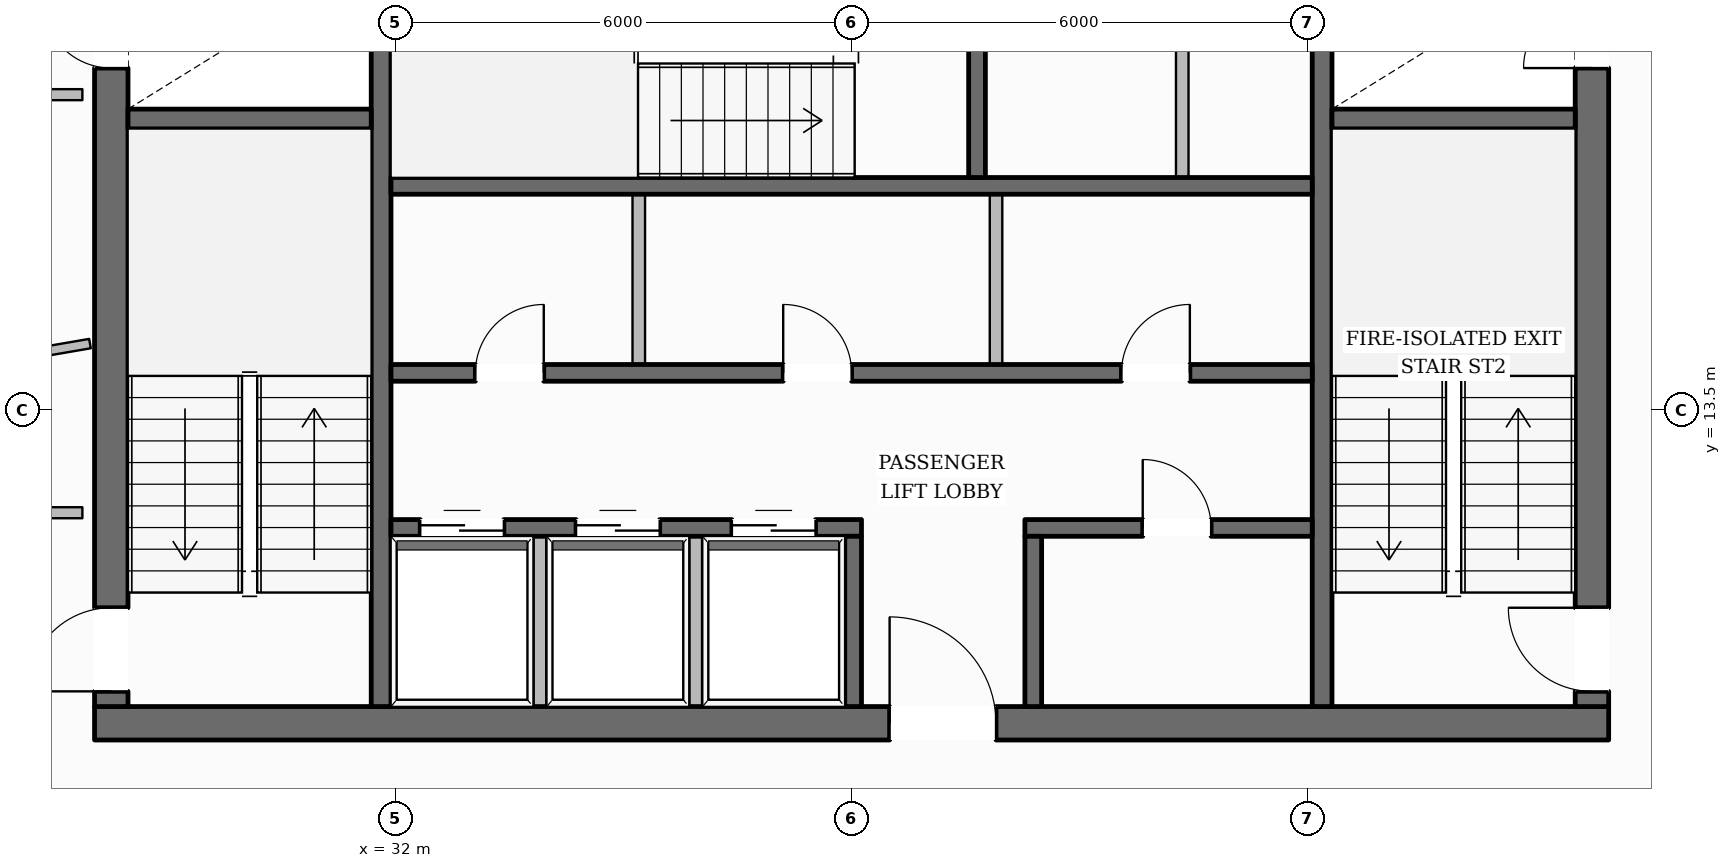
"""IFC4 building model, lengths in metres.
Left out: names, types, materials, properties, quantities, classifications, styles, units other than length and angle.
Written with IfcOpenShell. Run it as: python <this file> out.ifc"""

import sys

from ifc_helpers import new_model, si_unit, direction, frame, frame_2d, origin, place, context, subcontext, project, spatial, rectangle, extrude, element, fill, save


model = new_model("IFC4")
c1 = context("Model", 3, precision=1e-05, world=origin(), true_north=direction((0.0, 1.0)))
c2 = subcontext(c1, "Body", "Model", "MODEL_VIEW")
j1 = project(units=[si_unit("LENGTHUNIT", "METRE"), si_unit("PLANEANGLEUNIT", "RADIAN")], contexts=[c1])
p1 = place(None, origin())
s1 = spatial("IfcSite", under=j1, at=p1, CompositionType="ELEMENT")
p2 = place(p1, origin())
s2 = spatial("IfcBuilding", under=s1, at=p2, CompositionType="ELEMENT")
p3 = place(p2, frame((0.0, 0.0, 184.25)))
s3 = spatial("IfcBuildingStorey", under=s2, at=p3, CompositionType="ELEMENT", Elevation=184.25)
p4 = place(p3, frame((28.04, 9.38, 0.0), z_axis=(0.0, 0.0, 1.0), x_axis=(1.0, 0.0, 0.0)))
e1 = element("IfcWall", 1, at=p4, inside=s3, PredefinedType="SOLIDWALL", context=c2, shape_type="SweptSolid", body=[
    extrude(rectangle(XDim=19.92, YDim=0.44, at=frame_2d((9.96, 0.0))), origin(), (0.0, 0.0, 1.0), 3.6),
])
p5 = place(p4, frame((10.46, 0.0, 0.0)))
e2 = element("IfcOpeningElement", 2, at=p5, cuts=e1, PredefinedType="OPENING", context=c2, shape_type="SweptSolid", body=[
    extrude(rectangle(XDim=1.4, YDim=2.2, at=frame_2d((0.7, 1.1))), frame((0.0, 0.23, 0.0), z_axis=(0.0, -1.0, 0.0), x_axis=(1.0, 0.0, 0.0)), (0.0, 0.0, 1.0), 0.46),
])
p6 = place(p3, frame((28.26, 9.6, 0.0), z_axis=(0.0, 0.0, 1.0), x_axis=(0.0, 1.0, 0.0)))
e3 = element("IfcWall", 3, at=p6, inside=s3, PredefinedType="SOLIDWALL", context=c2, shape_type="SweptSolid", body=[
    extrude(rectangle(XDim=13.0, YDim=0.44, at=frame_2d((6.5, 0.0))), origin(), (0.0, 0.0, 1.0), 3.6),
])
p7 = place(p6, frame((0.2, 0.0, 0.0)))
e4 = element("IfcOpeningElement", 4, at=p7, cuts=e3, PredefinedType="OPENING", context=c2, shape_type="SweptSolid", body=[
    extrude(rectangle(XDim=1.1, YDim=2.15, at=frame_2d((0.55, 1.075))), frame((0.0, 0.23, 0.0), z_axis=(0.0, -1.0, 0.0), x_axis=(1.0, 0.0, 0.0)), (0.0, 0.0, 1.0), 0.46),
])
p8 = place(p6, frame((8.4, 0.0, 0.0)))
e5 = element("IfcOpeningElement", 5, at=p8, cuts=e3, PredefinedType="OPENING", context=c2, shape_type="SweptSolid", body=[
    extrude(rectangle(XDim=0.9, YDim=2.1, at=frame_2d((0.45, 1.05))), frame((0.0, 0.23, 0.0), z_axis=(0.0, -1.0, 0.0), x_axis=(1.0, 0.0, 0.0)), (0.0, 0.0, 1.0), 0.46),
])
p9 = place(p3, frame((47.74, 9.6, 0.0), z_axis=(0.0, 0.0, 1.0), x_axis=(0.0, 1.0, 0.0)))
e6 = element("IfcWall", 6, at=p9, inside=s3, PredefinedType="SOLIDWALL", context=c2, shape_type="SweptSolid", body=[
    extrude(rectangle(XDim=13.0, YDim=0.44, at=frame_2d((6.5, 0.0))), origin(), (0.0, 0.0, 1.0), 3.6),
])
p10 = place(p9, frame((0.2, 0.0, 0.0)))
e7 = element("IfcOpeningElement", 7, at=p10, cuts=e6, PredefinedType="OPENING", context=c2, shape_type="SweptSolid", body=[
    extrude(rectangle(XDim=1.1, YDim=2.15, at=frame_2d((0.55, 1.075))), frame((0.0, 0.23, 0.0), z_axis=(0.0, -1.0, 0.0), x_axis=(1.0, 0.0, 0.0)), (0.0, 0.0, 1.0), 0.46),
])
p11 = place(p9, frame((8.4, 0.0, 0.0)))
e8 = element("IfcOpeningElement", 8, at=p11, cuts=e6, PredefinedType="OPENING", context=c2, shape_type="SweptSolid", body=[
    extrude(rectangle(XDim=0.9, YDim=2.1, at=frame_2d((0.45, 1.05))), frame((0.0, 0.23, 0.0), z_axis=(0.0, -1.0, 0.0), x_axis=(1.0, 0.0, 0.0)), (0.0, 0.0, 1.0), 0.46),
])
p12 = place(p3, frame((31.81, 9.6, 0.0), z_axis=(0.0, 0.0, 1.0), x_axis=(0.0, 1.0, 0.0)))
e9 = element("IfcWall", 9, at=p12, inside=s3, PredefinedType="SHEAR", context=c2, shape_type="SweptSolid", body=[
    extrude(rectangle(XDim=13.0, YDim=0.26, at=frame_2d((6.5, 0.0))), origin(), (0.0, 0.0, 1.0), 3.6),
])
p13 = place(p12, frame((10.925, 0.0, 0.0)))
e10 = element("IfcOpeningElement", 10, at=p13, cuts=e9, PredefinedType="OPENING", context=c2, shape_type="SweptSolid", body=[
    extrude(rectangle(XDim=1.25, YDim=2.25, at=frame_2d((0.625, 1.125))), frame((0.0, 0.14, 0.0), z_axis=(0.0, -1.0, 0.0), x_axis=(1.0, 0.0, 0.0)), (0.0, 0.0, 1.0), 0.28),
])
p14 = place(p3, frame((44.19, 9.6, 0.0), z_axis=(0.0, 0.0, 1.0), x_axis=(0.0, 1.0, 0.0)))
e11 = element("IfcWall", 11, at=p14, inside=s3, PredefinedType="SHEAR", context=c2, shape_type="SweptSolid", body=[
    extrude(rectangle(XDim=13.0, YDim=0.26, at=frame_2d((6.5, 0.0))), origin(), (0.0, 0.0, 1.0), 3.6),
])
p15 = place(p14, frame((10.925, 0.0, 0.0)))
e12 = element("IfcOpeningElement", 12, at=p15, cuts=e11, PredefinedType="OPENING", context=c2, shape_type="SweptSolid", body=[
    extrude(rectangle(XDim=1.25, YDim=2.25, at=frame_2d((0.625, 1.125))), frame((0.0, 0.14, 0.0), z_axis=(0.0, -1.0, 0.0), x_axis=(1.0, 0.0, 0.0)), (0.0, 0.0, 1.0), 0.28),
])
for number, where, z_axis, x_axis in (
    (13, (28.48, 17.33, 0.0), (0.0, 0.0, 1.0), (1.0, 0.0, 0.0)),
    (14, (44.32, 17.33, 0.0), (0.0, 0.0, 1.0), (1.0, 0.0, 0.0)),
):
    element("IfcWall", number, at=place(p3, frame(where, z_axis=z_axis, x_axis=x_axis)), inside=s3, PredefinedType="SHEAR", context=c2, shape_type="SweptSolid", body=[
        extrude(rectangle(XDim=3.2, YDim=0.26, at=frame_2d((1.6, 0.0))), origin(), (0.0, 0.0, 1.0), 3.6),
    ])
p16 = place(p3, frame((31.94, 16.45, 0.0), z_axis=(0.0, 0.0, 1.0), x_axis=(1.0, 0.0, 0.0)))
e15 = element("IfcWall", 15, at=p16, inside=s3, PredefinedType="SOLIDWALL", context=c2, shape_type="SweptSolid", body=[
    extrude(rectangle(XDim=12.12, YDim=0.22, at=frame_2d((6.06, 0.0))), origin(), (0.0, 0.0, 1.0), 3.6),
])
p17 = place(p3, frame((39.65, 16.56, 0.0), z_axis=(0.0, 0.0, 1.0), x_axis=(0.0, 1.0, 0.0)))
e16 = element("IfcWall", 16, at=p17, inside=s3, PredefinedType="SOLIDWALL", context=c2, shape_type="SweptSolid", body=[
    extrude(rectangle(XDim=3.2, YDim=0.22, at=frame_2d((1.6, 0.0))), origin(), (0.0, 0.0, 1.0), 3.6),
])
p18 = place(p3, frame((31.94, 13.99, 0.0), z_axis=(0.0, 0.0, 1.0), x_axis=(1.0, 0.0, 0.0)))
e17 = element("IfcWall", 17, at=p18, inside=s3, PredefinedType="SOLIDWALL", context=c2, shape_type="SweptSolid", body=[
    extrude(rectangle(XDim=12.12, YDim=0.22, at=frame_2d((6.06, 0.0))), origin(), (0.0, 0.0, 1.0), 3.6),
])
p19 = place(p18, frame((1.11, 0.0, 0.0)))
e18 = element("IfcOpeningElement", 18, at=p19, cuts=e17, PredefinedType="OPENING", context=c2, shape_type="SweptSolid", body=[
    extrude(rectangle(XDim=0.9, YDim=2.1, at=frame_2d((0.45, 1.05))), frame((0.0, 0.12, 0.0), z_axis=(0.0, -1.0, 0.0), x_axis=(1.0, 0.0, 0.0)), (0.0, 0.0, 1.0), 0.24),
])
p20 = place(p18, frame((5.16, 0.0, 0.0)))
e19 = element("IfcOpeningElement", 19, at=p20, cuts=e17, PredefinedType="OPENING", context=c2, shape_type="SweptSolid", body=[
    extrude(rectangle(XDim=0.9, YDim=2.1, at=frame_2d((0.45, 1.05))), frame((0.0, 0.12, 0.0), z_axis=(0.0, -1.0, 0.0), x_axis=(1.0, 0.0, 0.0)), (0.0, 0.0, 1.0), 0.24),
])
p21 = place(p18, frame((9.61, 0.0, 0.0)))
e20 = element("IfcOpeningElement", 20, at=p21, cuts=e17, PredefinedType="OPENING", context=c2, shape_type="SweptSolid", body=[
    extrude(rectangle(XDim=0.9, YDim=2.1, at=frame_2d((0.45, 1.05))), frame((0.0, 0.12, 0.0), z_axis=(0.0, -1.0, 0.0), x_axis=(1.0, 0.0, 0.0)), (0.0, 0.0, 1.0), 0.24),
])
p22 = place(p3, frame((31.94, 11.95, 0.0), z_axis=(0.0, 0.0, 1.0), x_axis=(1.0, 0.0, 0.0)))
e21 = element("IfcWall", 21, at=p22, inside=s3, PredefinedType="SOLIDWALL", context=c2, shape_type="SweptSolid", body=[
    extrude(rectangle(XDim=6.19, YDim=0.22, at=frame_2d((3.095, 0.0))), origin(), (0.0, 0.0, 1.0), 3.6),
])
p23 = place(p22, frame((0.385, 0.0, 0.0)))
e22 = element("IfcOpeningElement", 22, at=p23, cuts=e21, PredefinedType="OPENING", context=c2, shape_type="SweptSolid", body=[
    extrude(rectangle(XDim=1.1, YDim=2.2, at=frame_2d((0.55, 1.1))), frame((0.0, 0.12, 0.0), z_axis=(0.0, -1.0, 0.0), x_axis=(1.0, 0.0, 0.0)), (0.0, 0.0, 1.0), 0.24),
])
p24 = place(p22, frame((2.435, 0.0, 0.0)))
e23 = element("IfcOpeningElement", 23, at=p24, cuts=e21, PredefinedType="OPENING", context=c2, shape_type="SweptSolid", body=[
    extrude(rectangle(XDim=1.1, YDim=2.2, at=frame_2d((0.55, 1.1))), frame((0.0, 0.12, 0.0), z_axis=(0.0, -1.0, 0.0), x_axis=(1.0, 0.0, 0.0)), (0.0, 0.0, 1.0), 0.24),
])
p25 = place(p22, frame((4.485, 0.0, 0.0)))
e24 = element("IfcOpeningElement", 24, at=p25, cuts=e21, PredefinedType="OPENING", context=c2, shape_type="SweptSolid", body=[
    extrude(rectangle(XDim=1.1, YDim=2.2, at=frame_2d((0.55, 1.1))), frame((0.0, 0.12, 0.0), z_axis=(0.0, -1.0, 0.0), x_axis=(1.0, 0.0, 0.0)), (0.0, 0.0, 1.0), 0.24),
])
p26 = place(p3, frame((40.28, 11.95, 0.0), z_axis=(0.0, 0.0, 1.0), x_axis=(1.0, 0.0, 0.0)))
e25 = element("IfcWall", 25, at=p26, inside=s3, PredefinedType="SOLIDWALL", context=c2, shape_type="SweptSolid", body=[
    extrude(rectangle(XDim=3.78, YDim=0.22, at=frame_2d((1.89, 0.0))), origin(), (0.0, 0.0, 1.0), 3.6),
])
p27 = place(p26, frame((1.55, 0.0, 0.0)))
e26 = element("IfcOpeningElement", 26, at=p27, cuts=e25, PredefinedType="OPENING", context=c2, shape_type="SweptSolid", body=[
    extrude(rectangle(XDim=0.9, YDim=2.1, at=frame_2d((0.45, 1.05))), frame((0.0, 0.12, 0.0), z_axis=(0.0, -1.0, 0.0), x_axis=(1.0, 0.0, 0.0)), (0.0, 0.0, 1.0), 0.24),
])
for number, where, z_axis, x_axis in (
    (27, (38.02, 9.6, 0.0), (0.0, 0.0, 1.0), (0.0, 1.0, 0.0)),
    (28, (40.39, 9.6, 0.0), (0.0, 0.0, 1.0), (0.0, 1.0, 0.0)),
):
    element("IfcWall", number, at=place(p3, frame(where, z_axis=z_axis, x_axis=x_axis)), inside=s3, PredefinedType="SOLIDWALL", context=c2, shape_type="SweptSolid", body=[
        extrude(rectangle(XDim=2.24, YDim=0.22, at=frame_2d((1.12, 0.0))), origin(), (0.0, 0.0, 1.0), 3.6),
    ])
p28 = place(p3, frame((15.064, 11.953, 0.0), z_axis=(0.0, 0.0, 1.0), x_axis=(0.495993114815, 0.86832645362, 0.0)))
e29 = element("IfcWall", 29, at=p28, inside=s3, PredefinedType="STANDARD", context=c2, shape_type="SweptSolid", body=[
    extrude(rectangle(XDim=37.324, YDim=0.35, at=frame_2d((18.662, 0.0))), origin(), (0.0, 0.0, 1.0), 3.132),
])
p29 = place(p28, frame((33.087, 0.0, 0.65)))
e30 = element("IfcOpeningElement", 30, at=p29, cuts=e29, PredefinedType="OPENING", context=c2, shape_type="SweptSolid", body=[
    extrude(rectangle(XDim=1.45, YDim=1.75, at=frame_2d((0.725, 0.875))), frame((0.0, 0.185, 0.0), z_axis=(0.0, -1.0, 0.0), x_axis=(1.0, 0.0, 0.0)), (0.0, 0.0, 1.0), 0.37),
])
p30 = place(p28, frame((27.026, 0.0, 0.65)))
e31 = element("IfcOpeningElement", 31, at=p30, cuts=e29, PredefinedType="OPENING", context=c2, shape_type="SweptSolid", body=[
    extrude(rectangle(XDim=1.45, YDim=1.75, at=frame_2d((0.725, 0.875))), frame((0.0, 0.185, 0.0), z_axis=(0.0, -1.0, 0.0), x_axis=(1.0, 0.0, 0.0)), (0.0, 0.0, 1.0), 0.37),
])
p31 = place(p28, frame((14.904, 0.0, 0.65)))
e32 = element("IfcOpeningElement", 32, at=p31, cuts=e29, PredefinedType="OPENING", context=c2, shape_type="SweptSolid", body=[
    extrude(rectangle(XDim=1.45, YDim=1.75, at=frame_2d((0.725, 0.875))), frame((0.0, 0.185, 0.0), z_axis=(0.0, -1.0, 0.0), x_axis=(1.0, 0.0, 0.0)), (0.0, 0.0, 1.0), 0.37),
])
p32 = place(p28, frame((8.844, 0.0, 0.65)))
e33 = element("IfcOpeningElement", 33, at=p32, cuts=e29, PredefinedType="OPENING", context=c2, shape_type="SweptSolid", body=[
    extrude(rectangle(XDim=1.45, YDim=1.75, at=frame_2d((0.725, 0.875))), frame((0.0, 0.185, 0.0), z_axis=(0.0, -1.0, 0.0), x_axis=(1.0, 0.0, 0.0)), (0.0, 0.0, 1.0), 0.37),
])
p33 = place(p28, frame((2.782, 0.0, 0.65)))
e34 = element("IfcOpeningElement", 34, at=p33, cuts=e29, PredefinedType="OPENING", context=c2, shape_type="SweptSolid", body=[
    extrude(rectangle(XDim=1.45, YDim=1.75, at=frame_2d((0.725, 0.875))), frame((0.0, 0.185, 0.0), z_axis=(0.0, -1.0, 0.0), x_axis=(1.0, 0.0, 0.0)), (0.0, 0.0, 1.0), 0.37),
])
p34 = place(p3, frame((42.575, 44.272, 0.0), z_axis=(0.0, 0.0, 1.0), x_axis=(0.503934681705, -0.863741764982, 0.0)))
e35 = element("IfcWall", 35, at=p34, inside=s3, PredefinedType="STANDARD", context=c2, shape_type="SweptSolid", body=[
    extrude(rectangle(XDim=37.915, YDim=0.35, at=frame_2d((18.958, 0.0))), origin(), (0.0, 0.0, 1.0), 3.132),
])
p35 = place(p34, frame((33.633, 0.0, 0.65)))
e36 = element("IfcOpeningElement", 36, at=p35, cuts=e35, PredefinedType="OPENING", context=c2, shape_type="SweptSolid", body=[
    extrude(rectangle(XDim=1.45, YDim=1.75, at=frame_2d((0.725, 0.875))), frame((0.0, 0.185, 0.0), z_axis=(0.0, -1.0, 0.0), x_axis=(1.0, 0.0, 0.0)), (0.0, 0.0, 1.0), 0.37),
])
p36 = place(p34, frame((27.472, 0.0, 0.65)))
e37 = element("IfcOpeningElement", 37, at=p36, cuts=e35, PredefinedType="OPENING", context=c2, shape_type="SweptSolid", body=[
    extrude(rectangle(XDim=1.45, YDim=1.75, at=frame_2d((0.725, 0.875))), frame((0.0, 0.185, 0.0), z_axis=(0.0, -1.0, 0.0), x_axis=(1.0, 0.0, 0.0)), (0.0, 0.0, 1.0), 0.37),
])
p37 = place(p34, frame((15.15, 0.0, 0.65)))
e38 = element("IfcOpeningElement", 38, at=p37, cuts=e35, PredefinedType="OPENING", context=c2, shape_type="SweptSolid", body=[
    extrude(rectangle(XDim=1.45, YDim=1.75, at=frame_2d((0.725, 0.875))), frame((0.0, 0.185, 0.0), z_axis=(0.0, -1.0, 0.0), x_axis=(1.0, 0.0, 0.0)), (0.0, 0.0, 1.0), 0.37),
])
p38 = place(p34, frame((8.989, 0.0, 0.65)))
e39 = element("IfcOpeningElement", 39, at=p38, cuts=e35, PredefinedType="OPENING", context=c2, shape_type="SweptSolid", body=[
    extrude(rectangle(XDim=1.45, YDim=1.75, at=frame_2d((0.725, 0.875))), frame((0.0, 0.185, 0.0), z_axis=(0.0, -1.0, 0.0), x_axis=(1.0, 0.0, 0.0)), (0.0, 0.0, 1.0), 0.37),
])
p39 = place(p34, frame((2.828, 0.0, 0.65)))
e40 = element("IfcOpeningElement", 40, at=p39, cuts=e35, PredefinedType="OPENING", context=c2, shape_type="SweptSolid", body=[
    extrude(rectangle(XDim=1.45, YDim=1.75, at=frame_2d((0.725, 0.875))), frame((0.0, 0.185, 0.0), z_axis=(0.0, -1.0, 0.0), x_axis=(1.0, 0.0, 0.0)), (0.0, 0.0, 1.0), 0.37),
])
for number, where, z_axis, x_axis in (
    (41, (33.9, 9.52, 0.0), (0.0, 0.0, 1.0), (0.0, 1.0, 0.0)),
    (42, (35.95, 9.52, 0.0), (0.0, 0.0, 1.0), (0.0, 1.0, 0.0)),
):
    element("IfcWall", number, at=place(p3, frame(where, z_axis=z_axis, x_axis=x_axis)), inside=s3, PredefinedType="PARTITIONING", context=c2, shape_type="SweptSolid", body=[
        extrude(rectangle(XDim=2.32, YDim=0.165, at=frame_2d((1.16, 0.0))), origin(), (0.0, 0.0, 1.0), 3.6),
    ])
for number, where, z_axis, x_axis in (
    (43, (35.2, 14.1, 0.0), (0.0, 0.0, 1.0), (0.0, 1.0, 0.0)),
    (44, (39.9, 14.1, 0.0), (0.0, 0.0, 1.0), (0.0, 1.0, 0.0)),
):
    element("IfcWall", number, at=place(p3, frame(where, z_axis=z_axis, x_axis=x_axis)), inside=s3, PredefinedType="PARTITIONING", context=c2, shape_type="SweptSolid", body=[
        extrude(rectangle(XDim=2.24, YDim=0.165, at=frame_2d((1.12, 0.0))), origin(), (0.0, 0.0, 1.0), 3.6),
    ])
p40 = place(p3, frame((42.35, 16.56, 0.0), z_axis=(0.0, 0.0, 1.0), x_axis=(0.0, 1.0, 0.0)))
e45 = element("IfcWall", 45, at=p40, inside=s3, PredefinedType="PARTITIONING", context=c2, shape_type="SweptSolid", body=[
    extrude(rectangle(XDim=3.2, YDim=0.165, at=frame_2d((1.6, 0.0))), origin(), (0.0, 0.0, 1.0), 3.6),
])
for number, where, z_axis, x_axis in (
    (46, (27.88, 17.65, 0.0), (0.0, 0.0, 1.0), (-1.0, 0.0, 0.0)),
    (47, (26.06, 12.15, 0.0), (0.0, 0.0, 1.0), (1.0, 0.0, 0.0)),
):
    element("IfcWall", number, at=place(p3, frame(where, z_axis=z_axis, x_axis=x_axis)), inside=s3, PredefinedType="PARTITIONING", context=c2, shape_type="SweptSolid", body=[
        extrude(rectangle(XDim=1.82, YDim=0.145, at=frame_2d((0.91, 0.0))), origin(), (0.0, 0.0, 1.0), 3.141),
    ])
p41 = place(p3, frame((27.98, 14.375, 0.0), z_axis=(0.0, 0.0, 1.0), x_axis=(-0.9855033492, -0.169655971646, 0.0)))
e48 = element("IfcWall", 48, at=p41, inside=s3, PredefinedType="PARTITIONING", context=c2, shape_type="SweptSolid", body=[
    extrude(rectangle(XDim=12.315, YDim=0.125, at=frame_2d((6.158, 0.0))), origin(), (0.0, 0.0, 1.0), 3.141),
])
p42 = place(p7, origin())
e49 = element("IfcDoor", 49, at=p42, inside=s3, OperationType="SINGLE_SWING_LEFT", PredefinedType="DOOR", context=c2, shape_type="SweptSolid", body=[
    extrude(rectangle(XDim=1.1, YDim=2.15, at=frame_2d((0.55, 1.075))), frame((0.0, 0.025, 0.0), z_axis=(0.0, -1.0, 0.0), x_axis=(1.0, 0.0, 0.0)), (0.0, 0.0, 1.0), 0.05),
])
fill(e4, e49)
p43 = place(p10, origin())
e50 = element("IfcDoor", 50, at=p43, inside=s3, OperationType="SINGLE_SWING_RIGHT", PredefinedType="DOOR", context=c2, shape_type="SweptSolid", body=[
    extrude(rectangle(XDim=1.1, YDim=2.15, at=frame_2d((0.55, 1.075))), frame((0.0, 0.025, 0.0), z_axis=(0.0, -1.0, 0.0), x_axis=(1.0, 0.0, 0.0)), (0.0, 0.0, 1.0), 0.05),
])
fill(e7, e50)
p44 = place(p8, origin())
e51 = element("IfcDoor", 51, at=p44, inside=s3, OperationType="SINGLE_SWING_RIGHT", PredefinedType="DOOR", context=c2, shape_type="SweptSolid", body=[
    extrude(rectangle(XDim=0.9, YDim=2.1, at=frame_2d((0.45, 1.05))), frame((0.0, 0.025, 0.0), z_axis=(0.0, -1.0, 0.0), x_axis=(1.0, 0.0, 0.0)), (0.0, 0.0, 1.0), 0.05),
])
fill(e5, e51)
p45 = place(p11, origin())
e52 = element("IfcDoor", 52, at=p45, inside=s3, OperationType="SINGLE_SWING_LEFT", PredefinedType="DOOR", context=c2, shape_type="SweptSolid", body=[
    extrude(rectangle(XDim=0.9, YDim=2.1, at=frame_2d((0.45, 1.05))), frame((0.0, 0.025, 0.0), z_axis=(0.0, -1.0, 0.0), x_axis=(1.0, 0.0, 0.0)), (0.0, 0.0, 1.0), 0.05),
])
fill(e8, e52)
p46 = place(p5, origin())
e53 = element("IfcDoor", 53, at=p46, inside=s3, OperationType="SINGLE_SWING_LEFT", PredefinedType="DOOR", context=c2, shape_type="SweptSolid", body=[
    extrude(rectangle(XDim=1.4, YDim=2.2, at=frame_2d((0.7, 1.1))), frame((0.0, 0.025, 0.0), z_axis=(0.0, -1.0, 0.0), x_axis=(1.0, 0.0, 0.0)), (0.0, 0.0, 1.0), 0.05),
])
fill(e2, e53)
p47 = place(p23, origin())
e54 = element("IfcDoor", 54, at=p47, inside=s3, OperationType="DOUBLE_DOOR_SLIDING", PredefinedType="DOOR", context=c2, shape_type="SweptSolid", body=[
    extrude(rectangle(XDim=1.1, YDim=2.2, at=frame_2d((0.55, 1.1))), frame((0.0, 0.025, 0.0), z_axis=(0.0, -1.0, 0.0), x_axis=(1.0, 0.0, 0.0)), (0.0, 0.0, 1.0), 0.05),
])
fill(e22, e54)
p48 = place(p24, origin())
e55 = element("IfcDoor", 55, at=p48, inside=s3, OperationType="DOUBLE_DOOR_SLIDING", PredefinedType="DOOR", context=c2, shape_type="SweptSolid", body=[
    extrude(rectangle(XDim=1.1, YDim=2.2, at=frame_2d((0.55, 1.1))), frame((0.0, 0.025, 0.0), z_axis=(0.0, -1.0, 0.0), x_axis=(1.0, 0.0, 0.0)), (0.0, 0.0, 1.0), 0.05),
])
fill(e23, e55)
p49 = place(p25, origin())
e56 = element("IfcDoor", 56, at=p49, inside=s3, OperationType="DOUBLE_DOOR_SLIDING", PredefinedType="DOOR", context=c2, shape_type="SweptSolid", body=[
    extrude(rectangle(XDim=1.1, YDim=2.2, at=frame_2d((0.55, 1.1))), frame((0.0, 0.025, 0.0), z_axis=(0.0, -1.0, 0.0), x_axis=(1.0, 0.0, 0.0)), (0.0, 0.0, 1.0), 0.05),
])
fill(e24, e56)
p50 = place(p19, origin())
e57 = element("IfcDoor", 57, at=p50, inside=s3, OperationType="SINGLE_SWING_RIGHT", PredefinedType="DOOR", context=c2, shape_type="SweptSolid", body=[
    extrude(rectangle(XDim=0.9, YDim=2.1, at=frame_2d((0.45, 1.05))), frame((0.0, 0.025, 0.0), z_axis=(0.0, -1.0, 0.0), x_axis=(1.0, 0.0, 0.0)), (0.0, 0.0, 1.0), 0.05),
])
fill(e18, e57)
p51 = place(p20, origin())
e58 = element("IfcDoor", 58, at=p51, inside=s3, OperationType="SINGLE_SWING_LEFT", PredefinedType="DOOR", context=c2, shape_type="SweptSolid", body=[
    extrude(rectangle(XDim=0.9, YDim=2.1, at=frame_2d((0.45, 1.05))), frame((0.0, 0.025, 0.0), z_axis=(0.0, -1.0, 0.0), x_axis=(1.0, 0.0, 0.0)), (0.0, 0.0, 1.0), 0.05),
])
fill(e19, e58)
p52 = place(p21, origin())
e59 = element("IfcDoor", 59, at=p52, inside=s3, OperationType="SINGLE_SWING_RIGHT", PredefinedType="DOOR", context=c2, shape_type="SweptSolid", body=[
    extrude(rectangle(XDim=0.9, YDim=2.1, at=frame_2d((0.45, 1.05))), frame((0.0, 0.025, 0.0), z_axis=(0.0, -1.0, 0.0), x_axis=(1.0, 0.0, 0.0)), (0.0, 0.0, 1.0), 0.05),
])
fill(e20, e59)
p53 = place(p27, origin())
e60 = element("IfcDoor", 60, at=p53, inside=s3, OperationType="SINGLE_SWING_LEFT", PredefinedType="DOOR", context=c2, shape_type="SweptSolid", body=[
    extrude(rectangle(XDim=0.9, YDim=2.1, at=frame_2d((0.45, 1.05))), frame((0.0, 0.025, 0.0), z_axis=(0.0, -1.0, 0.0), x_axis=(1.0, 0.0, 0.0)), (0.0, 0.0, 1.0), 0.05),
])
fill(e26, e60)
save(model, sys.argv[1])
